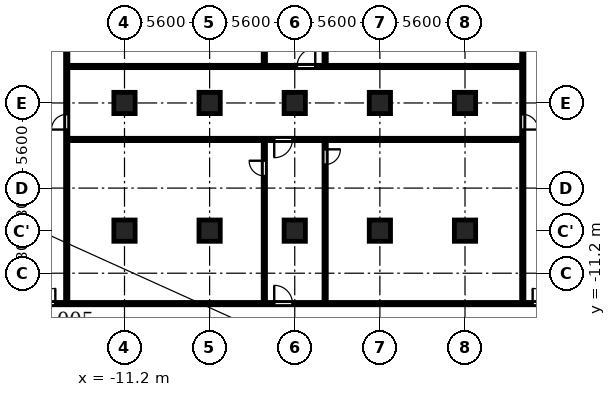
"""IFC4 building model, lengths in metres.
Left out: names, types, materials, properties, quantities, classifications, styles, units other than length and angle.
Written with IfcOpenShell. Run it as: python <this file> out.ifc"""

import sys

from ifc_helpers import new_model, si_unit, direction, frame, frame_2d, origin, origin_2d, place, context, subcontext, project, spatial, rectangle, extrude, element, fill, save


model = new_model("IFC4")
c1 = context("Model", 3, precision=1e-05, world=origin(), true_north=direction((0.0, 1.0)))
c2 = subcontext(c1, "Body", "Model", "MODEL_VIEW")
j1 = project(units=[si_unit("LENGTHUNIT", "METRE"), si_unit("PLANEANGLEUNIT", "RADIAN")], contexts=[c1])
p1 = place(None, origin())
s1 = spatial("IfcSite", under=j1, at=p1, CompositionType="ELEMENT")
p2 = place(p1, origin())
s2 = spatial("IfcBuilding", under=s1, at=p2, CompositionType="ELEMENT")
p3 = place(p2, frame((0.0, 0.0, -4.5)))
s3 = spatial("IfcBuildingStorey", under=s2, at=p3, CompositionType="ELEMENT", Elevation=-4.5)
for number, where, z_axis, x_axis in (
    (1, (-11.2, -8.4, 0.0), (0.0, 0.0, 1.0), (1.0, 0.0, 0.0)),
    (2, (-5.6, -8.4, 0.0), (0.0, 0.0, 1.0), (1.0, 0.0, 0.0)),
    (3, (0.0, -8.4, 0.0), (0.0, 0.0, 1.0), (1.0, 0.0, 0.0)),
    (4, (5.6, -8.4, 0.0), (0.0, 0.0, 1.0), (1.0, 0.0, 0.0)),
    (5, (11.2, -8.4, 0.0), (0.0, 0.0, 1.0), (1.0, 0.0, 0.0)),
    (6, (-11.2, 0.0, 0.0), (0.0, 0.0, 1.0), (1.0, 0.0, 0.0)),
    (7, (-5.6, 0.0, 0.0), (0.0, 0.0, 1.0), (1.0, 0.0, 0.0)),
    (8, (0.0, 0.0, 0.0), (0.0, 0.0, 1.0), (1.0, 0.0, 0.0)),
    (9, (5.6, 0.0, 0.0), (0.0, 0.0, 1.0), (1.0, 0.0, 0.0)),
    (10, (11.2, 0.0, 0.0), (0.0, 0.0, 1.0), (1.0, 0.0, 0.0)),
):
    element("IfcColumn", number, at=place(p3, frame(where, z_axis=z_axis, x_axis=x_axis)), inside=s3, PredefinedType="COLUMN", context=c2, shape_type="SweptSolid", body=[
        extrude(rectangle(XDim=1.4, YDim=1.4, at=origin_2d()), origin(), (0.0, 0.0, 1.0), 4.5),
    ])
p4 = place(p3, frame((-17.4, -13.2, 0.0), z_axis=(0.0, 0.0, 1.0), x_axis=(1.0, 0.0, 0.0)))
e11 = element("IfcWall", 11, at=p4, inside=s3, PredefinedType="PARTITIONING", context=c2, shape_type="SweptSolid", body=[
    extrude(rectangle(XDim=34.8, YDim=0.15, at=frame_2d((17.4, 0.0))), origin(), (0.0, 0.0, 1.0), 4.05),
])
p5 = place(p4, frame((16.05, 0.0, 0.0)))
e12 = element("IfcOpeningElement", 12, at=p5, cuts=e11, PredefinedType="OPENING", context=c2, shape_type="SweptSolid", body=[
    extrude(rectangle(XDim=1.2, YDim=2.1, at=frame_2d((0.6, 1.05))), frame((0.0, 0.085, 0.0), z_axis=(0.0, -1.0, 0.0), x_axis=(1.0, 0.0, 0.0)), (0.0, 0.0, 1.0), 0.17),
])
p6 = place(p4, frame((0.65, 0.0, 0.0)))
e13 = element("IfcOpeningElement", 13, at=p6, cuts=e11, PredefinedType="OPENING", context=c2, shape_type="SweptSolid", body=[
    extrude(rectangle(XDim=1.0, YDim=2.1, at=frame_2d((0.5, 1.05))), frame((0.0, 0.085, 0.0), z_axis=(0.0, -1.0, 0.0), x_axis=(1.0, 0.0, 0.0)), (0.0, 0.0, 1.0), 0.17),
])
p7 = place(p4, frame((33.05, 0.0, 0.0)))
e14 = element("IfcOpeningElement", 14, at=p7, cuts=e11, PredefinedType="OPENING", context=c2, shape_type="SweptSolid", body=[
    extrude(rectangle(XDim=1.0, YDim=2.1, at=frame_2d((0.5, 1.05))), frame((0.0, 0.085, 0.0), z_axis=(0.0, -1.0, 0.0), x_axis=(1.0, 0.0, 0.0)), (0.0, 0.0, 1.0), 0.17),
])
p8 = place(p3, frame((-14.925, -2.4, 0.0), z_axis=(0.0, 0.0, 1.0), x_axis=(1.0, 0.0, 0.0)))
e15 = element("IfcWall", 15, at=p8, inside=s3, PredefinedType="PARTITIONING", context=c2, shape_type="SweptSolid", body=[
    extrude(rectangle(XDim=29.85, YDim=0.15, at=frame_2d((14.925, 0.0))), origin(), (0.0, 0.0, 1.0), 4.05),
])
p9 = place(p8, frame((13.575, 0.0, 0.0)))
e16 = element("IfcOpeningElement", 16, at=p9, cuts=e15, PredefinedType="OPENING", context=c2, shape_type="SweptSolid", body=[
    extrude(rectangle(XDim=1.2, YDim=2.1, at=frame_2d((0.6, 1.05))), frame((0.0, 0.085, 0.0), z_axis=(0.0, -1.0, 0.0), x_axis=(1.0, 0.0, 0.0)), (0.0, 0.0, 1.0), 0.17),
])
p10 = place(p3, frame((-14.925, 2.4, 0.0), z_axis=(0.0, 0.0, 1.0), x_axis=(1.0, 0.0, 0.0)))
e17 = element("IfcWall", 17, at=p10, inside=s3, PredefinedType="PARTITIONING", context=c2, shape_type="SweptSolid", body=[
    extrude(rectangle(XDim=29.85, YDim=0.15, at=frame_2d((14.925, 0.0))), origin(), (0.0, 0.0, 1.0), 4.05),
])
p11 = place(p10, frame((15.075, 0.0, 0.0)))
e18 = element("IfcOpeningElement", 18, at=p11, cuts=e17, PredefinedType="OPENING", context=c2, shape_type="SweptSolid", body=[
    extrude(rectangle(XDim=1.2, YDim=2.1, at=frame_2d((0.6, 1.05))), frame((0.0, 0.085, 0.0), z_axis=(0.0, -1.0, 0.0), x_axis=(1.0, 0.0, 0.0)), (0.0, 0.0, 1.0), 0.17),
])
p12 = place(p3, frame((-15.0, -13.125, 0.0), z_axis=(0.0, 0.0, 1.0), x_axis=(0.0, 1.0, 0.0)))
e19 = element("IfcWall", 19, at=p12, inside=s3, PredefinedType="PARTITIONING", context=c2, shape_type="SweptSolid", body=[
    extrude(rectangle(XDim=26.25, YDim=0.15, at=frame_2d((13.125, 0.0))), origin(), (0.0, 0.0, 1.0), 4.05),
])
p13 = place(p12, frame((11.375, 0.0, 0.0)))
e20 = element("IfcOpeningElement", 20, at=p13, cuts=e19, PredefinedType="OPENING", context=c2, shape_type="SweptSolid", body=[
    extrude(rectangle(XDim=1.0, YDim=2.1, at=frame_2d((0.5, 1.05))), frame((0.0, 0.085, 0.0), z_axis=(0.0, -1.0, 0.0), x_axis=(1.0, 0.0, 0.0)), (0.0, 0.0, 1.0), 0.17),
])
p14 = place(p3, frame((-2.0, -13.125, 0.0), z_axis=(0.0, 0.0, 1.0), x_axis=(0.0, 1.0, 0.0)))
e21 = element("IfcWall", 21, at=p14, inside=s3, PredefinedType="PARTITIONING", context=c2, shape_type="SweptSolid", body=[
    extrude(rectangle(XDim=10.65, YDim=0.15, at=frame_2d((5.325, 0.0))), origin(), (0.0, 0.0, 1.0), 4.05),
])
p15 = place(p14, frame((8.325, 0.0, 0.0)))
e22 = element("IfcOpeningElement", 22, at=p15, cuts=e21, PredefinedType="OPENING", context=c2, shape_type="SweptSolid", body=[
    extrude(rectangle(XDim=1.0, YDim=2.1, at=frame_2d((0.5, 1.05))), frame((0.0, 0.085, 0.0), z_axis=(0.0, -1.0, 0.0), x_axis=(1.0, 0.0, 0.0)), (0.0, 0.0, 1.0), 0.17),
])
p16 = place(p3, frame((-2.0, 2.475, 0.0), z_axis=(0.0, 0.0, 1.0), x_axis=(0.0, 1.0, 0.0)))
e23 = element("IfcWall", 23, at=p16, inside=s3, PredefinedType="PARTITIONING", context=c2, shape_type="SweptSolid", body=[
    extrude(rectangle(XDim=10.65, YDim=0.15, at=frame_2d((5.325, 0.0))), origin(), (0.0, 0.0, 1.0), 4.05),
])
p17 = place(p16, frame((9.175, 0.0, 0.0)))
e24 = element("IfcOpeningElement", 24, at=p17, cuts=e23, PredefinedType="OPENING", context=c2, shape_type="SweptSolid", body=[
    extrude(rectangle(XDim=0.9, YDim=2.1, at=frame_2d((0.45, 1.05))), frame((0.0, 0.085, 0.0), z_axis=(0.0, -1.0, 0.0), x_axis=(1.0, 0.0, 0.0)), (0.0, 0.0, 1.0), 0.17),
])
p18 = place(p3, frame((2.0, -13.125, 0.0), z_axis=(0.0, 0.0, 1.0), x_axis=(0.0, 1.0, 0.0)))
e25 = element("IfcWall", 25, at=p18, inside=s3, PredefinedType="PARTITIONING", context=c2, shape_type="SweptSolid", body=[
    extrude(rectangle(XDim=10.65, YDim=0.15, at=frame_2d((5.325, 0.0))), origin(), (0.0, 0.0, 1.0), 4.05),
])
p19 = place(p18, frame((9.075, 0.0, 0.0)))
e26 = element("IfcOpeningElement", 26, at=p19, cuts=e25, PredefinedType="OPENING", context=c2, shape_type="SweptSolid", body=[
    extrude(rectangle(XDim=1.0, YDim=2.1, at=frame_2d((0.5, 1.05))), frame((0.0, 0.085, 0.0), z_axis=(0.0, -1.0, 0.0), x_axis=(1.0, 0.0, 0.0)), (0.0, 0.0, 1.0), 0.17),
])
p20 = place(p3, frame((2.0, 2.475, 0.0), z_axis=(0.0, 0.0, 1.0), x_axis=(0.0, 1.0, 0.0)))
e27 = element("IfcWall", 27, at=p20, inside=s3, PredefinedType="PARTITIONING", context=c2, shape_type="SweptSolid", body=[
    extrude(rectangle(XDim=10.65, YDim=0.15, at=frame_2d((5.325, 0.0))), origin(), (0.0, 0.0, 1.0), 4.05),
])
p21 = place(p20, frame((8.325, 0.0, 0.0)))
e28 = element("IfcOpeningElement", 28, at=p21, cuts=e27, PredefinedType="OPENING", context=c2, shape_type="SweptSolid", body=[
    extrude(rectangle(XDim=0.9, YDim=2.1, at=frame_2d((0.45, 1.05))), frame((0.0, 0.085, 0.0), z_axis=(0.0, -1.0, 0.0), x_axis=(1.0, 0.0, 0.0)), (0.0, 0.0, 1.0), 0.17),
])
p22 = place(p3, frame((15.0, -13.125, 0.0), z_axis=(0.0, 0.0, 1.0), x_axis=(0.0, 1.0, 0.0)))
e29 = element("IfcWall", 29, at=p22, inside=s3, PredefinedType="PARTITIONING", context=c2, shape_type="SweptSolid", body=[
    extrude(rectangle(XDim=26.25, YDim=0.15, at=frame_2d((13.125, 0.0))), origin(), (0.0, 0.0, 1.0), 4.05),
])
p23 = place(p22, frame((11.375, 0.0, 0.0)))
e30 = element("IfcOpeningElement", 30, at=p23, cuts=e29, PredefinedType="OPENING", context=c2, shape_type="SweptSolid", body=[
    extrude(rectangle(XDim=1.0, YDim=2.1, at=frame_2d((0.5, 1.05))), frame((0.0, 0.085, 0.0), z_axis=(0.0, -1.0, 0.0), x_axis=(1.0, 0.0, 0.0)), (0.0, 0.0, 1.0), 0.17),
])
p24 = place(p13, origin())
e31 = element("IfcDoor", 31, at=p24, inside=s3, OperationType="SINGLE_SWING_RIGHT", PredefinedType="DOOR", context=c2, shape_type="SweptSolid", body=[
    extrude(rectangle(XDim=1.0, YDim=2.1, at=frame_2d((0.5, 1.05))), frame((0.0, 0.025, 0.0), z_axis=(0.0, -1.0, 0.0), x_axis=(1.0, 0.0, 0.0)), (0.0, 0.0, 1.0), 0.05),
])
fill(e20, e31)
p25 = place(p23, origin())
e32 = element("IfcDoor", 32, at=p25, inside=s3, OperationType="SINGLE_SWING_LEFT", PredefinedType="DOOR", context=c2, shape_type="SweptSolid", body=[
    extrude(rectangle(XDim=1.0, YDim=2.1, at=frame_2d((0.5, 1.05))), frame((0.0, 0.025, 0.0), z_axis=(0.0, -1.0, 0.0), x_axis=(1.0, 0.0, 0.0)), (0.0, 0.0, 1.0), 0.05),
])
fill(e30, e32)
p26 = place(p11, origin())
e33 = element("IfcDoor", 33, at=p26, inside=s3, OperationType="SINGLE_SWING_LEFT", PredefinedType="DOOR", context=c2, shape_type="SweptSolid", body=[
    extrude(rectangle(XDim=1.2, YDim=2.1, at=frame_2d((0.6, 1.05))), frame((0.0, 0.025, 0.0), z_axis=(0.0, -1.0, 0.0), x_axis=(1.0, 0.0, 0.0)), (0.0, 0.0, 1.0), 0.05),
])
fill(e18, e33)
p27 = place(p9, origin())
e34 = element("IfcDoor", 34, at=p27, inside=s3, OperationType="SINGLE_SWING_LEFT", PredefinedType="DOOR", context=c2, shape_type="SweptSolid", body=[
    extrude(rectangle(XDim=1.2, YDim=2.1, at=frame_2d((0.6, 1.05))), frame((0.0, 0.025, 0.0), z_axis=(0.0, -1.0, 0.0), x_axis=(1.0, 0.0, 0.0)), (0.0, 0.0, 1.0), 0.05),
])
fill(e16, e34)
p28 = place(p5, origin())
e35 = element("IfcDoor", 35, at=p28, inside=s3, OperationType="SINGLE_SWING_RIGHT", PredefinedType="DOOR", context=c2, shape_type="SweptSolid", body=[
    extrude(rectangle(XDim=1.2, YDim=2.1, at=frame_2d((0.6, 1.05))), frame((0.0, 0.025, 0.0), z_axis=(0.0, -1.0, 0.0), x_axis=(1.0, 0.0, 0.0)), (0.0, 0.0, 1.0), 0.05),
])
fill(e12, e35)
p29 = place(p6, origin())
e36 = element("IfcDoor", 36, at=p29, inside=s3, OperationType="SINGLE_SWING_LEFT", PredefinedType="DOOR", context=c2, shape_type="SweptSolid", body=[
    extrude(rectangle(XDim=1.0, YDim=2.1, at=frame_2d((0.5, 1.05))), frame((0.0, 0.025, 0.0), z_axis=(0.0, -1.0, 0.0), x_axis=(1.0, 0.0, 0.0)), (0.0, 0.0, 1.0), 0.05),
])
fill(e13, e36)
p30 = place(p7, origin())
e37 = element("IfcDoor", 37, at=p30, inside=s3, OperationType="SINGLE_SWING_RIGHT", PredefinedType="DOOR", context=c2, shape_type="SweptSolid", body=[
    extrude(rectangle(XDim=1.0, YDim=2.1, at=frame_2d((0.5, 1.05))), frame((0.0, 0.025, 0.0), z_axis=(0.0, -1.0, 0.0), x_axis=(1.0, 0.0, 0.0)), (0.0, 0.0, 1.0), 0.05),
])
fill(e14, e37)
p31 = place(p15, origin())
e38 = element("IfcDoor", 38, at=p31, inside=s3, OperationType="SINGLE_SWING_LEFT", PredefinedType="DOOR", context=c2, shape_type="SweptSolid", body=[
    extrude(rectangle(XDim=1.0, YDim=2.1, at=frame_2d((0.5, 1.05))), frame((0.0, 0.025, 0.0), z_axis=(0.0, -1.0, 0.0), x_axis=(1.0, 0.0, 0.0)), (0.0, 0.0, 1.0), 0.05),
])
fill(e22, e38)
p32 = place(p19, origin())
e39 = element("IfcDoor", 39, at=p32, inside=s3, OperationType="SINGLE_SWING_RIGHT", PredefinedType="DOOR", context=c2, shape_type="SweptSolid", body=[
    extrude(rectangle(XDim=1.0, YDim=2.1, at=frame_2d((0.5, 1.05))), frame((0.0, 0.025, 0.0), z_axis=(0.0, -1.0, 0.0), x_axis=(1.0, 0.0, 0.0)), (0.0, 0.0, 1.0), 0.05),
])
fill(e26, e39)
save(model, sys.argv[1])
